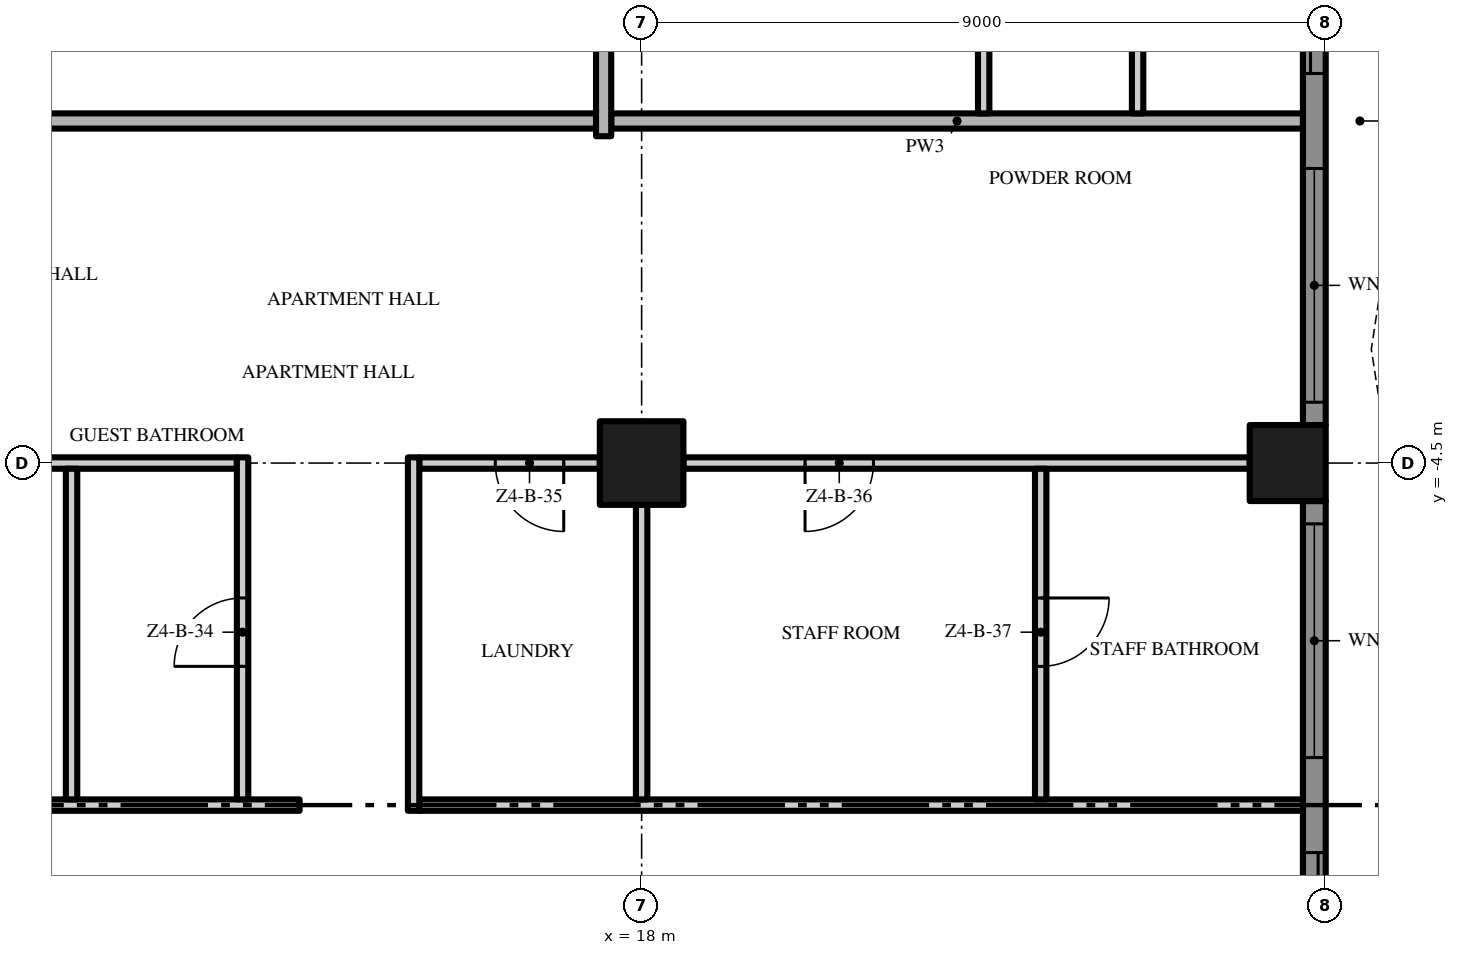
"""IFC4 building model, lengths in metres.
Left out: names, types, materials, properties, quantities, classifications, styles, units other than length and angle.
Written with IfcOpenShell. Run it as: python <this file> out.ifc"""

import sys

from ifc_helpers import new_model, si_unit, direction, frame, frame_2d, origin, origin_2d, place, context, subcontext, project, spatial, polyline, rectangle, outline, extrude, element, fill, save


model = new_model("IFC4")
c1 = context("Model", 3, precision=1e-05, world=origin(), true_north=direction((0.0, 1.0)))
c2 = subcontext(c1, "Body", "Model", "MODEL_VIEW")
j1 = project(units=[si_unit("LENGTHUNIT", "METRE"), si_unit("PLANEANGLEUNIT", "RADIAN")], contexts=[c1])
p1 = place(None, origin())
s1 = spatial("IfcSite", under=j1, at=p1, CompositionType="ELEMENT")
p2 = place(p1, origin())
s2 = spatial("IfcBuilding", under=s1, at=p2, CompositionType="ELEMENT")
p3 = place(p2, frame((0.0, 0.0, 203.4)))
s3 = spatial("IfcBuildingStorey", under=s2, at=p3, CompositionType="ELEMENT", Elevation=203.4)
p4 = place(p3, frame((18.0, -4.5, 0.0), z_axis=(0.0, 0.0, 1.0), x_axis=(1.0, 0.0, 0.0)))
e1 = element("IfcColumn", 1, at=p4, inside=s3, PredefinedType="COLUMN", context=c2, shape_type="SweptSolid", body=[
    extrude(rectangle(XDim=1.1, YDim=1.1, at=origin_2d()), origin(), (0.0, 0.0, 1.0), 3.5),
])
p5 = place(p3, frame((26.5, -4.5, 0.0), z_axis=(0.0, 0.0, 1.0), x_axis=(1.0, 0.0, 0.0)))
e2 = element("IfcColumn", 2, at=p5, inside=s3, PredefinedType="COLUMN", context=c2, shape_type="SweptSolid", body=[
    extrude(rectangle(XDim=1.0, YDim=1.0, at=origin_2d()), origin(), (0.0, 0.0, 1.0), 3.5),
])
p6 = place(p3, frame((26.85, -5.0, 0.0), z_axis=(0.0, 0.0, 1.0), x_axis=(0.0, -1.0, 0.0)))
e3 = element("IfcWall", 3, at=p6, inside=s3, PredefinedType="SOLIDWALL", context=c2, shape_type="SweptSolid", body=[
    extrude(rectangle(XDim=8.0, YDim=0.3, at=frame_2d((4.0, 0.0))), origin(), (0.0, 0.0, 1.0), 3.5),
])
p7 = place(p6, frame((4.625, 0.0, 0.0)))
e4 = element("IfcOpeningElement", 4, at=p7, cuts=e3, PredefinedType="OPENING", context=c2, shape_type="SweptSolid", body=[
    extrude(rectangle(XDim=3.075, YDim=2.4, at=frame_2d((1.538, 1.2))), frame((0.0, 0.16, 0.0), z_axis=(0.0, -1.0, 0.0), x_axis=(1.0, 0.0, 0.0)), (0.0, 0.0, 1.0), 0.32),
])
p8 = place(p6, frame((0.3, 0.0, 0.45)))
e5 = element("IfcOpeningElement", 5, at=p8, cuts=e3, PredefinedType="OPENING", context=c2, shape_type="SweptSolid", body=[
    extrude(rectangle(XDim=3.075, YDim=2.65, at=frame_2d((1.538, 1.325))), frame((0.0, 0.16, 0.0), z_axis=(0.0, -1.0, 0.0), x_axis=(1.0, 0.0, 0.0)), (0.0, 0.0, 1.0), 0.32),
])
p9 = place(p3, frame((26.85, 4.0, 0.0), z_axis=(0.0, 0.0, 1.0), x_axis=(0.0, -1.0, 0.0)))
e6 = element("IfcWall", 6, at=p9, inside=s3, PredefinedType="SOLIDWALL", context=c2, shape_type="SweptSolid", body=[
    extrude(rectangle(XDim=8.0, YDim=0.3, at=frame_2d((4.0, 0.0))), origin(), (0.0, 0.0, 1.0), 3.5),
])
p10 = place(p9, frame((4.625, 0.0, 0.45)))
e7 = element("IfcOpeningElement", 7, at=p10, cuts=e6, PredefinedType="OPENING", context=c2, shape_type="SweptSolid", body=[
    extrude(rectangle(XDim=3.075, YDim=2.65, at=frame_2d((1.538, 1.325))), frame((0.0, 0.16, 0.0), z_axis=(0.0, -1.0, 0.0), x_axis=(1.0, 0.0, 0.0)), (0.0, 0.0, 1.0), 0.32),
])
p11 = place(p9, frame((0.3, 0.0, 0.0)))
e8 = element("IfcOpeningElement", 8, at=p11, cuts=e6, PredefinedType="OPENING", context=c2, shape_type="SweptSolid", body=[
    extrude(rectangle(XDim=3.075, YDim=2.4, at=frame_2d((1.538, 1.2))), frame((0.0, 0.16, 0.0), z_axis=(0.0, -1.0, 0.0), x_axis=(1.0, 0.0, 0.0)), (0.0, 0.0, 1.0), 0.32),
])
p12 = place(p3, origin())
e9 = element("IfcWall", 9, at=p12, inside=s3, PredefinedType="USERDEFINED", context=c2, shape_type="SweptSolid", body=[
    extrude(outline(polyline([(27.6, -18.0), (27.829, -16.5), (28.429, -15.0), (29.171, -13.5), (29.771, -12.0), (30.0, -10.5), (29.771, -9.0), (29.171, -7.5), (28.429, -6.0), (27.829, -4.5), (27.6, -3.0), (27.829, -1.5), (28.429, 0.0), (29.171, 1.5), (29.771, 3.0), (30.0, 4.5), (29.771, 6.0), (29.171, 7.5), (28.429, 9.0), (27.829, 10.5), (27.6, 12.0), (27.829, 13.5), (28.429, 15.0), (29.171, 16.5), (29.771, 18.0), (29.539, 18.093), (28.942, 16.602), (28.201, 15.102), (27.586, 13.566), (27.347, 12.0), (27.586, 10.434), (28.201, 8.898), (28.942, 7.398), (29.528, 5.934), (29.747, 4.5), (29.528, 3.066), (28.942, 1.602), (28.201, 0.102), (27.586, -1.434), (27.347, -3.0), (27.586, -4.566), (28.201, -6.102), (28.942, -7.602), (29.528, -9.066), (29.747, -10.5), (29.528, -11.934), (28.942, -13.398), (28.201, -14.898), (27.586, -16.434), (27.353, -17.962), (27.6, -18.0)])), origin(), (0.0, 0.0, 1.0), 0.9),
])
p13 = place(p3, frame((0.1, -9.0, 0.0), z_axis=(0.0, 0.0, 1.0), x_axis=(1.0, 0.0, 0.0)))
e10 = element("IfcWall", 10, at=p13, inside=s3, PredefinedType="PARTITIONING", context=c2, shape_type="SweptSolid", body=[
    extrude(rectangle(XDim=13.4, YDim=0.15, at=frame_2d((6.7, 0.0))), origin(), (0.0, 0.0, 1.0), 3.5),
])
p14 = place(p13, frame((6.9, 0.0, 0.0)))
e11 = element("IfcOpeningElement", 11, at=p14, cuts=e10, PredefinedType="OPENING", context=c2, shape_type="SweptSolid", body=[
    extrude(rectangle(XDim=1.0, YDim=2.4, at=frame_2d((0.5, 1.2))), frame((0.0, 0.085, 0.0), z_axis=(0.0, -1.0, 0.0), x_axis=(1.0, 0.0, 0.0)), (0.0, 0.0, 1.0), 0.17),
])
p15 = place(p3, frame((15.075, -9.0, 0.0), z_axis=(0.0, 0.0, 1.0), x_axis=(1.0, 0.0, 0.0)))
e12 = element("IfcWall", 12, at=p15, inside=s3, PredefinedType="PARTITIONING", context=c2, shape_type="SweptSolid", body=[
    extrude(rectangle(XDim=11.625, YDim=0.15, at=frame_2d((5.812, 0.0))), origin(), (0.0, 0.0, 1.0), 3.5),
])
p16 = place(p3, frame((9.55, -4.5, 0.0), z_axis=(0.0, 0.0, 1.0), x_axis=(1.0, 0.0, 0.0)))
e13 = element("IfcWall", 13, at=p16, inside=s3, PredefinedType="PARTITIONING", context=c2, shape_type="SweptSolid", body=[
    extrude(rectangle(XDim=3.125, YDim=0.15, at=frame_2d((1.562, 0.0))), origin(), (0.0, 0.0, 1.0), 3.5),
])
p17 = place(p3, frame((17.45, -4.5, 0.0), z_axis=(0.0, 0.0, 1.0), x_axis=(-1.0, 0.0, 0.0)))
e14 = element("IfcWall", 14, at=p17, inside=s3, PredefinedType="PARTITIONING", context=c2, shape_type="SweptSolid", body=[
    extrude(rectangle(XDim=2.375, YDim=0.15, at=frame_2d((1.188, 0.0))), origin(), (0.0, 0.0, 1.0), 3.5),
])
p18 = place(p17, frame((0.475, 0.0, 0.0)))
e15 = element("IfcOpeningElement", 15, at=p18, cuts=e14, PredefinedType="OPENING", context=c2, shape_type="SweptSolid", body=[
    extrude(rectangle(XDim=0.9, YDim=2.1, at=frame_2d((0.45, 1.05))), frame((0.0, 0.085, 0.0), z_axis=(0.0, -1.0, 0.0), x_axis=(1.0, 0.0, 0.0)), (0.0, 0.0, 1.0), 0.17),
])
p19 = place(p3, frame((26.0, -4.5, 0.0), z_axis=(0.0, 0.0, 1.0), x_axis=(-1.0, 0.0, 0.0)))
e16 = element("IfcWall", 16, at=p19, inside=s3, PredefinedType="PARTITIONING", context=c2, shape_type="SweptSolid", body=[
    extrude(rectangle(XDim=7.45, YDim=0.15, at=frame_2d((3.725, 0.0))), origin(), (0.0, 0.0, 1.0), 3.5),
])
p20 = place(p19, frame((4.95, 0.0, 0.0)))
e17 = element("IfcOpeningElement", 17, at=p20, cuts=e16, PredefinedType="OPENING", context=c2, shape_type="SweptSolid", body=[
    extrude(rectangle(XDim=0.9, YDim=2.1, at=frame_2d((0.45, 1.05))), frame((0.0, 0.085, 0.0), z_axis=(0.0, -1.0, 0.0), x_axis=(1.0, 0.0, 0.0)), (0.0, 0.0, 1.0), 0.17),
])
p21 = place(p3, frame((17.4, 0.0, 0.0), z_axis=(0.0, 0.0, 1.0), x_axis=(-1.0, 0.0, 0.0)))
e18 = element("IfcWall", 18, at=p21, inside=s3, PredefinedType="PARTITIONING", context=c2, shape_type="SweptSolid", body=[
    extrude(rectangle(XDim=17.3, YDim=0.2, at=frame_2d((8.65, 0.0))), origin(), (0.0, 0.0, 1.0), 3.5),
])
p22 = place(p21, frame((7.65, 0.0, 0.0)))
e19 = element("IfcOpeningElement", 19, at=p22, cuts=e18, PredefinedType="OPENING", context=c2, shape_type="SweptSolid", body=[
    extrude(rectangle(XDim=1.5, YDim=2.4, at=frame_2d((0.75, 1.2))), frame((0.0, 0.11, 0.0), z_axis=(0.0, -1.0, 0.0), x_axis=(1.0, 0.0, 0.0)), (0.0, 0.0, 1.0), 0.22),
])
p23 = place(p3, frame((17.6, 0.0, 0.0), z_axis=(0.0, 0.0, 1.0), x_axis=(1.0, 0.0, 0.0)))
e20 = element("IfcWall", 20, at=p23, inside=s3, PredefinedType="PARTITIONING", context=c2, shape_type="SweptSolid", body=[
    extrude(rectangle(XDim=9.1, YDim=0.2, at=frame_2d((4.55, 0.0))), origin(), (0.0, 0.0, 1.0), 3.5),
])
p24 = place(p3, frame((10.5, -8.925, 0.0), z_axis=(0.0, 0.0, 1.0), x_axis=(0.0, 1.0, 0.0)))
e21 = element("IfcWall", 21, at=p24, inside=s3, PredefinedType="PARTITIONING", context=c2, shape_type="SweptSolid", body=[
    extrude(rectangle(XDim=4.35, YDim=0.15, at=frame_2d((2.175, 0.0))), origin(), (0.0, 0.0, 1.0), 3.5),
])
p25 = place(p3, frame((12.75, -8.925, 0.0), z_axis=(0.0, 0.0, 1.0), x_axis=(0.0, 1.0, 0.0)))
e22 = element("IfcWall", 22, at=p25, inside=s3, PredefinedType="PARTITIONING", context=c2, shape_type="SweptSolid", body=[
    extrude(rectangle(XDim=4.5, YDim=0.15, at=frame_2d((2.25, 0.0))), origin(), (0.0, 0.0, 1.0), 3.5),
])
p26 = place(p25, frame((1.75, 0.0, 0.0)))
e23 = element("IfcOpeningElement", 23, at=p26, cuts=e22, PredefinedType="OPENING", context=c2, shape_type="SweptSolid", body=[
    extrude(rectangle(XDim=0.9, YDim=2.1, at=frame_2d((0.45, 1.05))), frame((0.0, 0.085, 0.0), z_axis=(0.0, -1.0, 0.0), x_axis=(1.0, 0.0, 0.0)), (0.0, 0.0, 1.0), 0.17),
])
p27 = place(p3, frame((15.0, -9.075, 0.0), z_axis=(0.0, 0.0, 1.0), x_axis=(0.0, 1.0, 0.0)))
e24 = element("IfcWall", 24, at=p27, inside=s3, PredefinedType="PARTITIONING", context=c2, shape_type="SweptSolid", body=[
    extrude(rectangle(XDim=4.65, YDim=0.15, at=frame_2d((2.325, 0.0))), origin(), (0.0, 0.0, 1.0), 3.5),
])
p28 = place(p3, frame((17.5, -0.2, 0.0), z_axis=(0.0, 0.0, 1.0), x_axis=(0.0, 1.0, 0.0)))
e25 = element("IfcWall", 25, at=p28, inside=s3, PredefinedType="PARTITIONING", context=c2, shape_type="SweptSolid", body=[
    extrude(rectangle(XDim=4.15, YDim=0.2, at=frame_2d((2.075, 0.0))), origin(), (0.0, 0.0, 1.0), 3.5),
])
p29 = place(p3, frame((18.0, -8.925, 0.0), z_axis=(0.0, 0.0, 1.0), x_axis=(0.0, 1.0, 0.0)))
e26 = element("IfcWall", 26, at=p29, inside=s3, PredefinedType="PARTITIONING", context=c2, shape_type="SweptSolid", body=[
    extrude(rectangle(XDim=3.875, YDim=0.15, at=frame_2d((1.938, 0.0))), origin(), (0.0, 0.0, 1.0), 3.5),
])
p30 = place(p3, frame((22.5, 17.5, 0.0), z_axis=(0.0, 0.0, 1.0), x_axis=(0.0, -1.0, 0.0)))
e27 = element("IfcWall", 27, at=p30, inside=s3, PredefinedType="PARTITIONING", context=c2, shape_type="SweptSolid", body=[
    extrude(rectangle(XDim=17.4, YDim=0.15, at=frame_2d((8.7, 0.0))), origin(), (0.0, 0.0, 1.0), 3.5),
])
p31 = place(p30, frame((13.2, 0.0, 0.0)))
e28 = element("IfcOpeningElement", 28, at=p31, cuts=e27, PredefinedType="OPENING", context=c2, shape_type="SweptSolid", body=[
    extrude(rectangle(XDim=1.8, YDim=2.4, at=frame_2d((0.9, 1.2))), frame((0.0, 0.085, 0.0), z_axis=(0.0, -1.0, 0.0), x_axis=(1.0, 0.0, 0.0)), (0.0, 0.0, 1.0), 0.17),
])
p32 = place(p30, frame((5.75, 0.0, 0.0)))
e29 = element("IfcOpeningElement", 29, at=p32, cuts=e27, PredefinedType="OPENING", context=c2, shape_type="SweptSolid", body=[
    extrude(rectangle(XDim=1.0, YDim=2.4, at=frame_2d((0.5, 1.2))), frame((0.0, 0.085, 0.0), z_axis=(0.0, -1.0, 0.0), x_axis=(1.0, 0.0, 0.0)), (0.0, 0.0, 1.0), 0.17),
])
p33 = place(p3, frame((23.25, -4.575, 0.0), z_axis=(0.0, 0.0, 1.0), x_axis=(0.0, -1.0, 0.0)))
e30 = element("IfcWall", 30, at=p33, inside=s3, PredefinedType="PARTITIONING", context=c2, shape_type="SweptSolid", body=[
    extrude(rectangle(XDim=4.35, YDim=0.15, at=frame_2d((2.175, 0.0))), origin(), (0.0, 0.0, 1.0), 3.5),
])
p34 = place(p33, frame((1.7, 0.0, 0.0)))
e31 = element("IfcOpeningElement", 31, at=p34, cuts=e30, PredefinedType="OPENING", context=c2, shape_type="SweptSolid", body=[
    extrude(rectangle(XDim=0.9, YDim=2.1, at=frame_2d((0.45, 1.05))), frame((0.0, 0.085, 0.0), z_axis=(0.0, -1.0, 0.0), x_axis=(1.0, 0.0, 0.0)), (0.0, 0.0, 1.0), 0.17),
])
p35 = place(p3, frame((24.525, 0.1, 0.0), z_axis=(0.0, 0.0, 1.0), x_axis=(0.0, 1.0, 0.0)))
e32 = element("IfcWall", 32, at=p35, inside=s3, PredefinedType="PARTITIONING", context=c2, shape_type="SweptSolid", body=[
    extrude(rectangle(XDim=2.225, YDim=0.15, at=frame_2d((1.113, 0.0))), origin(), (0.0, 0.0, 1.0), 3.5),
])
p36 = place(p7, origin())
e33 = element("IfcDoor", 33, at=p36, inside=s3, OperationType="SINGLE_SWING_LEFT", PredefinedType="DOOR", context=c2, shape_type="SweptSolid", body=[
    extrude(rectangle(XDim=3.075, YDim=2.4, at=frame_2d((1.538, 1.2))), frame((0.0, 0.025, 0.0), z_axis=(0.0, -1.0, 0.0), x_axis=(1.0, 0.0, 0.0)), (0.0, 0.0, 1.0), 0.05),
])
fill(e4, e33)
p37 = place(p8, origin())
e34 = element("IfcWindow", 34, at=p37, inside=s3, PartitioningType="SINGLE_PANEL", PredefinedType="WINDOW", context=c2, shape_type="SweptSolid", body=[
    extrude(rectangle(XDim=3.075, YDim=2.65, at=frame_2d((1.538, 1.325))), frame((0.0, 0.03, 0.0), z_axis=(0.0, -1.0, 0.0), x_axis=(1.0, 0.0, 0.0)), (0.0, 0.0, 1.0), 0.06),
])
fill(e5, e34)
p38 = place(p10, origin())
e35 = element("IfcWindow", 35, at=p38, inside=s3, PartitioningType="SINGLE_PANEL", PredefinedType="WINDOW", context=c2, shape_type="SweptSolid", body=[
    extrude(rectangle(XDim=3.075, YDim=2.65, at=frame_2d((1.538, 1.325))), frame((0.0, 0.03, 0.0), z_axis=(0.0, -1.0, 0.0), x_axis=(1.0, 0.0, 0.0)), (0.0, 0.0, 1.0), 0.06),
])
fill(e7, e35)
p39 = place(p11, origin())
e36 = element("IfcDoor", 36, at=p39, inside=s3, OperationType="SINGLE_SWING_LEFT", PredefinedType="DOOR", context=c2, shape_type="SweptSolid", body=[
    extrude(rectangle(XDim=3.075, YDim=2.4, at=frame_2d((1.538, 1.2))), frame((0.0, 0.025, 0.0), z_axis=(0.0, -1.0, 0.0), x_axis=(1.0, 0.0, 0.0)), (0.0, 0.0, 1.0), 0.05),
])
fill(e8, e36)
p40 = place(p26, origin())
e37 = element("IfcDoor", 37, at=p40, inside=s3, OperationType="SINGLE_SWING_LEFT", PredefinedType="DOOR", context=c2, shape_type="SweptSolid", body=[
    extrude(rectangle(XDim=0.9, YDim=2.1, at=frame_2d((0.45, 1.05))), frame((0.0, 0.025, 0.0), z_axis=(0.0, -1.0, 0.0), x_axis=(1.0, 0.0, 0.0)), (0.0, 0.0, 1.0), 0.05),
])
fill(e23, e37)
p41 = place(p18, origin())
e38 = element("IfcDoor", 38, at=p41, inside=s3, OperationType="SINGLE_SWING_LEFT", PredefinedType="DOOR", context=c2, shape_type="SweptSolid", body=[
    extrude(rectangle(XDim=0.9, YDim=2.1, at=frame_2d((0.45, 1.05))), frame((0.0, 0.025, 0.0), z_axis=(0.0, -1.0, 0.0), x_axis=(1.0, 0.0, 0.0)), (0.0, 0.0, 1.0), 0.05),
])
fill(e15, e38)
p42 = place(p20, origin())
e39 = element("IfcDoor", 39, at=p42, inside=s3, OperationType="SINGLE_SWING_RIGHT", PredefinedType="DOOR", context=c2, shape_type="SweptSolid", body=[
    extrude(rectangle(XDim=0.9, YDim=2.1, at=frame_2d((0.45, 1.05))), frame((0.0, 0.025, 0.0), z_axis=(0.0, -1.0, 0.0), x_axis=(1.0, 0.0, 0.0)), (0.0, 0.0, 1.0), 0.05),
])
fill(e17, e39)
p43 = place(p34, origin())
e40 = element("IfcDoor", 40, at=p43, inside=s3, OperationType="SINGLE_SWING_LEFT", PredefinedType="DOOR", context=c2, shape_type="SweptSolid", body=[
    extrude(rectangle(XDim=0.9, YDim=2.1, at=frame_2d((0.45, 1.05))), frame((0.0, 0.025, 0.0), z_axis=(0.0, -1.0, 0.0), x_axis=(1.0, 0.0, 0.0)), (0.0, 0.0, 1.0), 0.05),
])
fill(e31, e40)
save(model, sys.argv[1])
